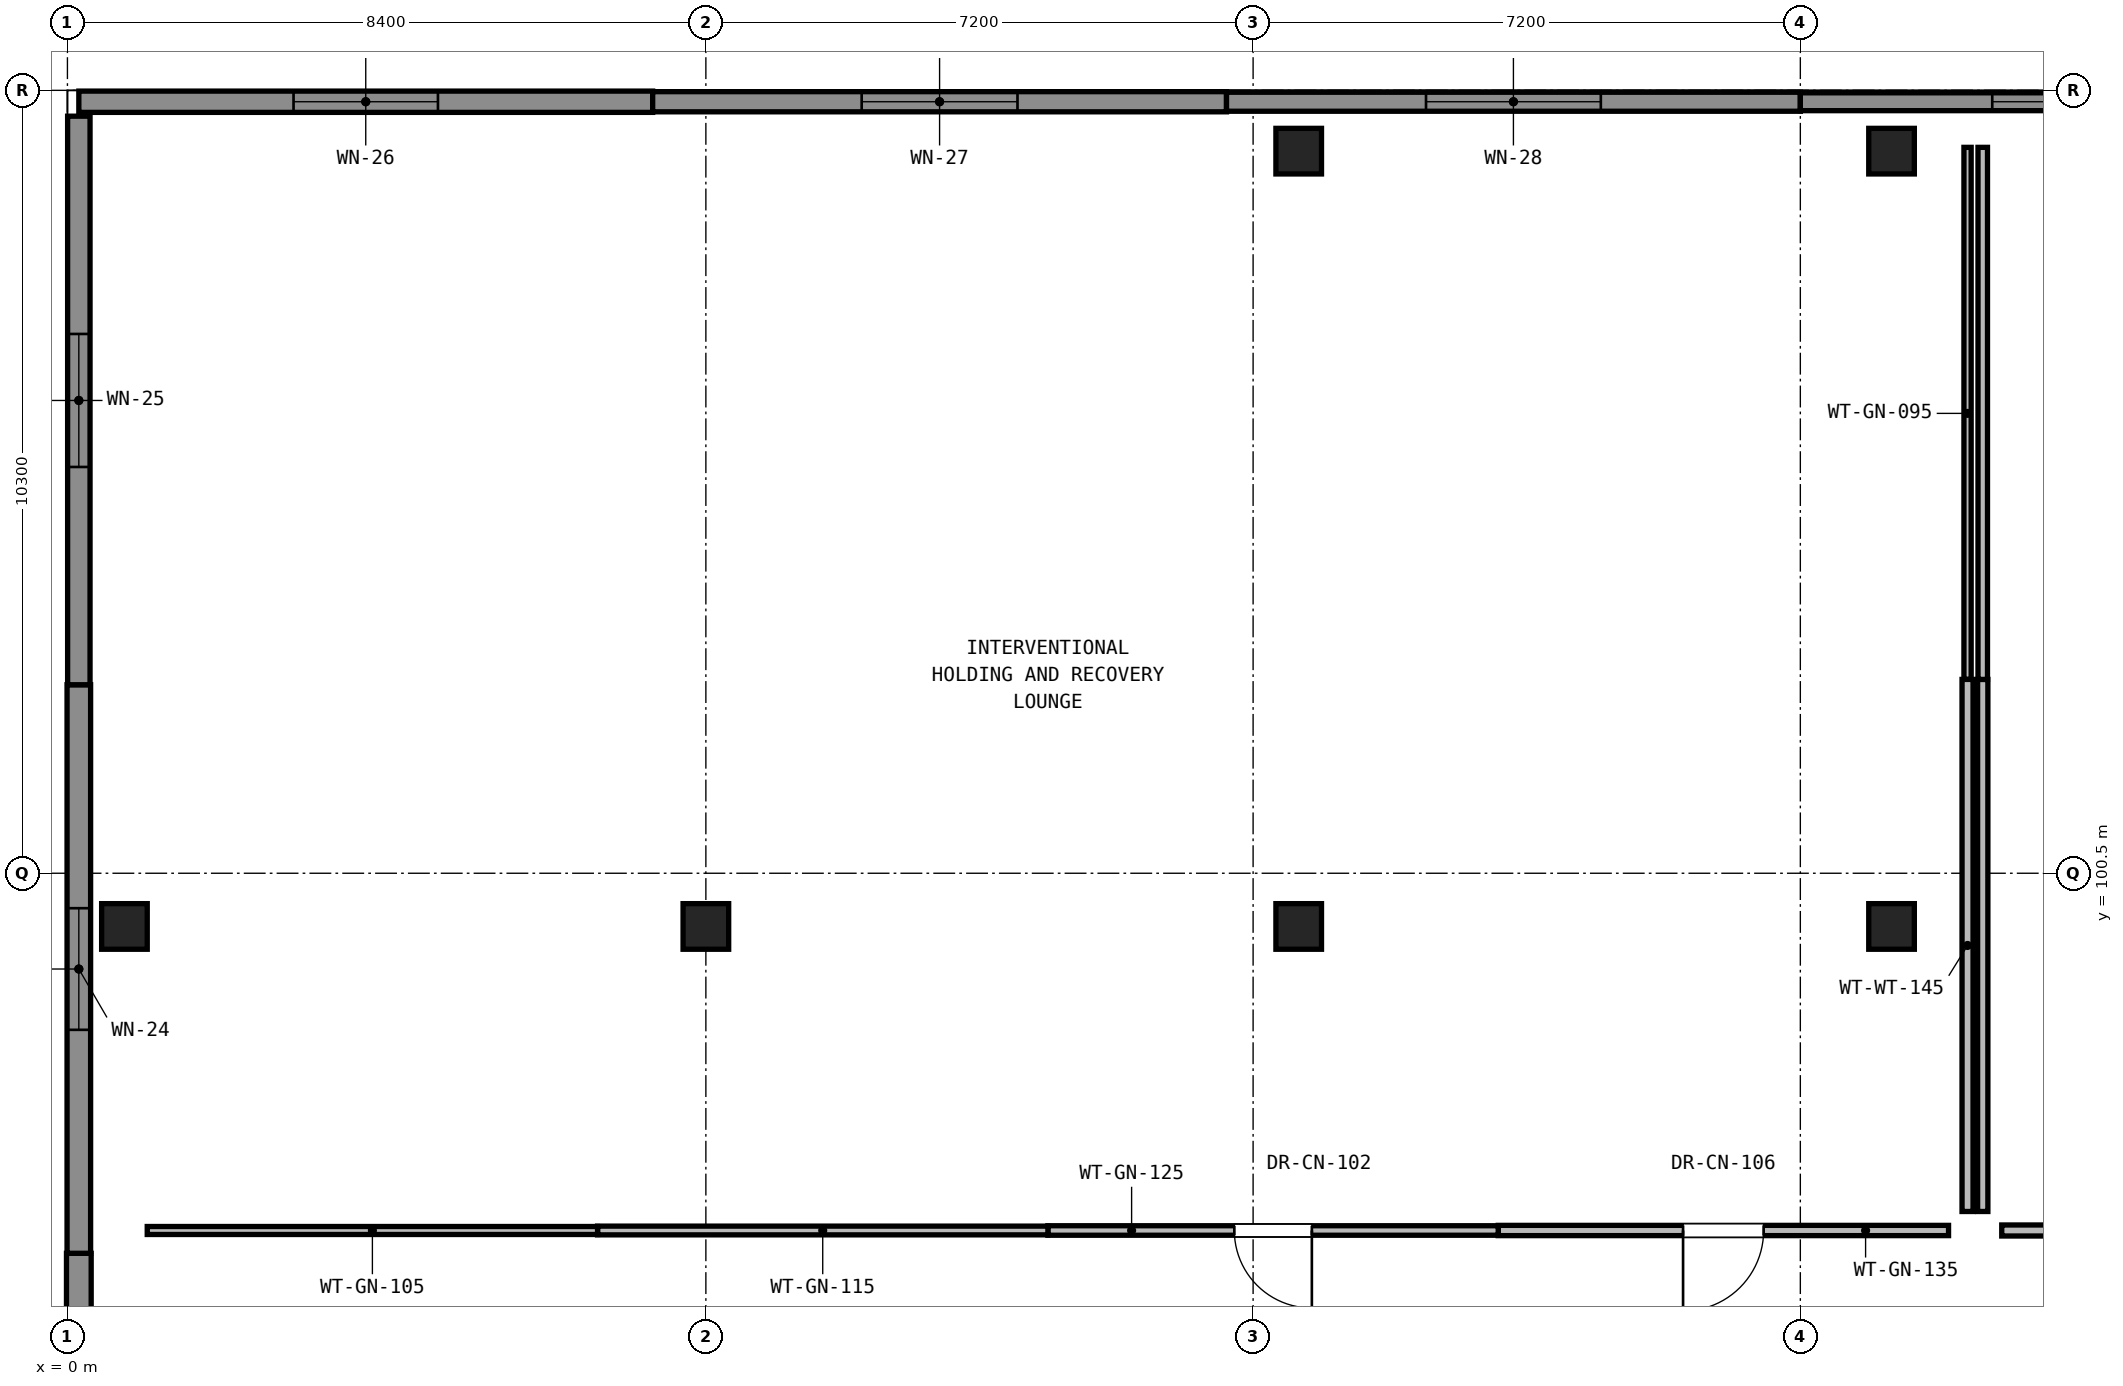
"""IFC4 building model, lengths in metres.
Left out: names, types, materials, properties, quantities, classifications, styles, units other than length and angle.
Written with IfcOpenShell. Run it as: python <this file> out.ifc"""

import sys

from ifc_helpers import new_model, si_unit, direction, frame, frame_2d, origin, origin_2d, place, context, subcontext, project, spatial, rectangle, extrude, element, fill, save


model = new_model("IFC4")
c1 = context("Model", 3, precision=1e-05, world=origin(), true_north=direction((0.0, 1.0)))
c2 = subcontext(c1, "Body", "Model", "MODEL_VIEW")
j1 = project(units=[si_unit("LENGTHUNIT", "METRE"), si_unit("PLANEANGLEUNIT", "RADIAN")], contexts=[c1])
p1 = place(None, origin())
s1 = spatial("IfcSite", under=j1, at=p1, CompositionType="ELEMENT")
p2 = place(p1, origin())
s2 = spatial("IfcBuilding", under=s1, at=p2, CompositionType="ELEMENT")
p3 = place(p2, frame((0.0, 0.0, 9.52)))
s3 = spatial("IfcBuildingStorey", under=s2, at=p3, CompositionType="ELEMENT", Elevation=9.52)
for number, where, z_axis, x_axis in (
    (1, (0.75, 99.8, 0.0), (0.0, 0.0, 1.0), (1.0, 0.0, 0.0)),
    (2, (8.4, 99.8, 0.0), (0.0, 0.0, 1.0), (1.0, 0.0, 0.0)),
    (3, (16.2, 99.8, 0.0), (0.0, 0.0, 1.0), (1.0, 0.0, 0.0)),
    (4, (16.2, 110.0, 0.0), (0.0, 0.0, 1.0), (1.0, 0.0, 0.0)),
    (5, (24.0, 99.8, 0.0), (0.0, 0.0, 1.0), (1.0, 0.0, 0.0)),
    (6, (24.0, 110.0, 0.0), (0.0, 0.0, 1.0), (1.0, 0.0, 0.0)),
):
    element("IfcColumn", number, at=place(p3, frame(where, z_axis=z_axis, x_axis=x_axis)), inside=s3, PredefinedType="COLUMN", context=c2, shape_type="SweptSolid", body=[
        extrude(rectangle(XDim=0.6, YDim=0.6, at=origin_2d()), origin(), (0.0, 0.0, 1.0), 4.08),
    ])
p4 = place(p3, frame((0.15, 88.02, 0.0), z_axis=(0.0, 0.0, 1.0), x_axis=(0.0, 1.0, 0.0)))
e7 = element("IfcWall", 7, at=p4, inside=s3, PredefinedType="SOLIDWALL", context=c2, shape_type="SweptSolid", body=[
    extrude(rectangle(XDim=7.48, YDim=0.325, at=frame_2d((3.74, 0.0))), origin(), (0.0, 0.0, 1.0), 3.843),
])
p5 = place(p4, frame((3.015, 0.0, 0.9)))
e8 = element("IfcOpeningElement", 8, at=p5, cuts=e7, PredefinedType="OPENING", context=c2, shape_type="SweptSolid", body=[
    extrude(rectangle(XDim=1.45, YDim=2.0, at=frame_2d((0.725, 1.0))), frame((0.0, 0.172, 0.0), z_axis=(0.0, -1.0, 0.0), x_axis=(1.0, 0.0, 0.0)), (0.0, 0.0, 1.0), 0.345),
])
p6 = place(p3, frame((0.15, 95.5, 0.0), z_axis=(0.0, 0.0, 1.0), x_axis=(0.0, 1.0, 0.0)))
e9 = element("IfcWall", 9, at=p6, inside=s3, PredefinedType="SOLIDWALL", context=c2, shape_type="SweptSolid", body=[
    extrude(rectangle(XDim=7.48, YDim=0.31, at=frame_2d((3.74, 0.0))), origin(), (0.0, 0.0, 1.0), 3.843),
])
p7 = place(p6, frame((2.94, 0.0, 0.9)))
e10 = element("IfcOpeningElement", 10, at=p7, cuts=e9, PredefinedType="OPENING", context=c2, shape_type="SweptSolid", body=[
    extrude(rectangle(XDim=1.6, YDim=2.0, at=frame_2d((0.8, 1.0))), frame((0.0, 0.165, 0.0), z_axis=(0.0, -1.0, 0.0), x_axis=(1.0, 0.0, 0.0)), (0.0, 0.0, 1.0), 0.33),
])
p8 = place(p3, frame((0.15, 102.98, 0.0), z_axis=(0.0, 0.0, 1.0), x_axis=(0.0, 1.0, 0.0)))
e11 = element("IfcWall", 11, at=p8, inside=s3, PredefinedType="SOLIDWALL", context=c2, shape_type="SweptSolid", body=[
    extrude(rectangle(XDim=7.48, YDim=0.295, at=frame_2d((3.74, 0.0))), origin(), (0.0, 0.0, 1.0), 3.843),
])
p9 = place(p8, frame((2.865, 0.0, 0.9)))
e12 = element("IfcOpeningElement", 12, at=p9, cuts=e11, PredefinedType="OPENING", context=c2, shape_type="SweptSolid", body=[
    extrude(rectangle(XDim=1.75, YDim=2.0, at=frame_2d((0.875, 1.0))), frame((0.0, 0.157, 0.0), z_axis=(0.0, -1.0, 0.0), x_axis=(1.0, 0.0, 0.0)), (0.0, 0.0, 1.0), 0.315),
])
p10 = place(p3, frame((0.15, 110.65, 0.0), z_axis=(0.0, 0.0, 1.0), x_axis=(1.0, 0.0, 0.0)))
e13 = element("IfcWall", 13, at=p10, inside=s3, PredefinedType="SOLIDWALL", context=c2, shape_type="SweptSolid", body=[
    extrude(rectangle(XDim=7.55, YDim=0.28, at=frame_2d((3.775, 0.0))), origin(), (0.0, 0.0, 1.0), 3.843),
])
p11 = place(p10, frame((2.825, 0.0, 0.9)))
e14 = element("IfcOpeningElement", 14, at=p11, cuts=e13, PredefinedType="OPENING", context=c2, shape_type="SweptSolid", body=[
    extrude(rectangle(XDim=1.9, YDim=2.0, at=frame_2d((0.95, 1.0))), frame((0.0, 0.15, 0.0), z_axis=(0.0, -1.0, 0.0), x_axis=(1.0, 0.0, 0.0)), (0.0, 0.0, 1.0), 0.3),
])
p12 = place(p3, frame((7.7, 110.65, 0.0), z_axis=(0.0, 0.0, 1.0), x_axis=(1.0, 0.0, 0.0)))
e15 = element("IfcWall", 15, at=p12, inside=s3, PredefinedType="SOLIDWALL", context=c2, shape_type="SweptSolid", body=[
    extrude(rectangle(XDim=7.55, YDim=0.265, at=frame_2d((3.775, 0.0))), origin(), (0.0, 0.0, 1.0), 3.843),
])
p13 = place(p12, frame((2.75, 0.0, 0.9)))
e16 = element("IfcOpeningElement", 16, at=p13, cuts=e15, PredefinedType="OPENING", context=c2, shape_type="SweptSolid", body=[
    extrude(rectangle(XDim=2.05, YDim=2.0, at=frame_2d((1.025, 1.0))), frame((0.0, 0.142, 0.0), z_axis=(0.0, -1.0, 0.0), x_axis=(1.0, 0.0, 0.0)), (0.0, 0.0, 1.0), 0.285),
])
p14 = place(p3, frame((15.25, 110.65, 0.0), z_axis=(0.0, 0.0, 1.0), x_axis=(1.0, 0.0, 0.0)))
e17 = element("IfcWall", 17, at=p14, inside=s3, PredefinedType="SOLIDWALL", context=c2, shape_type="SweptSolid", body=[
    extrude(rectangle(XDim=7.55, YDim=0.25, at=frame_2d((3.775, 0.0))), origin(), (0.0, 0.0, 1.0), 3.843),
])
p15 = place(p14, frame((2.625, 0.0, 0.9)))
e18 = element("IfcOpeningElement", 18, at=p15, cuts=e17, PredefinedType="OPENING", context=c2, shape_type="SweptSolid", body=[
    extrude(rectangle(XDim=2.3, YDim=2.0, at=frame_2d((1.15, 1.0))), frame((0.0, 0.135, 0.0), z_axis=(0.0, -1.0, 0.0), x_axis=(1.0, 0.0, 0.0)), (0.0, 0.0, 1.0), 0.27),
])
p16 = place(p3, frame((22.8, 110.65, 0.0), z_axis=(0.0, 0.0, 1.0), x_axis=(1.0, 0.0, 0.0)))
e19 = element("IfcWall", 19, at=p16, inside=s3, PredefinedType="SOLIDWALL", context=c2, shape_type="SweptSolid", body=[
    extrude(rectangle(XDim=7.55, YDim=0.235, at=frame_2d((3.775, 0.0))), origin(), (0.0, 0.0, 1.0), 3.843),
])
p17 = place(p16, frame((2.525, 0.0, 0.9)))
e20 = element("IfcOpeningElement", 20, at=p17, cuts=e19, PredefinedType="OPENING", context=c2, shape_type="SweptSolid", body=[
    extrude(rectangle(XDim=2.5, YDim=2.0, at=frame_2d((1.25, 1.0))), frame((0.0, 0.127, 0.0), z_axis=(0.0, -1.0, 0.0), x_axis=(1.0, 0.0, 0.0)), (0.0, 0.0, 1.0), 0.255),
])
p18 = place(p3, frame((25.0, 110.05, 0.0), z_axis=(0.0, 0.0, 1.0), x_axis=(0.0, -1.0, 0.0)))
e21 = element("IfcWall", 21, at=p18, inside=s3, PredefinedType="PARTITIONING", context=c2, shape_type="SweptSolid", body=[
    extrude(rectangle(XDim=7.0, YDim=0.095, at=frame_2d((3.5, 0.0))), origin(), (0.0, 0.0, 1.0), 3.143),
])
p19 = place(p3, frame((25.0, 103.05, 0.0), z_axis=(0.0, 0.0, 1.0), x_axis=(0.0, -1.0, 0.0)))
e22 = element("IfcWall", 22, at=p19, inside=s3, PredefinedType="PARTITIONING", context=c2, shape_type="SweptSolid", body=[
    extrude(rectangle(XDim=7.0, YDim=0.145, at=frame_2d((3.5, 0.0))), origin(), (0.0, 0.0, 1.0), 3.043),
])
p20 = place(p3, frame((24.75, 95.8, 0.0), z_axis=(0.0, 0.0, 1.0), x_axis=(-1.0, 0.0, 0.0)))
e23 = element("IfcWall", 23, at=p20, inside=s3, PredefinedType="PARTITIONING", context=c2, shape_type="SweptSolid", body=[
    extrude(rectangle(XDim=5.925, YDim=0.135, at=frame_2d((2.962, 0.0))), origin(), (0.0, 0.0, 1.0), 3.143),
])
p21 = place(p20, frame((2.433, 0.0, 0.0)))
e24 = element("IfcOpeningElement", 24, at=p21, cuts=e23, PredefinedType="OPENING", context=c2, shape_type="SweptSolid", body=[
    extrude(rectangle(XDim=1.06, YDim=2.15, at=frame_2d((0.53, 1.075))), frame((0.0, 0.077, 0.0), z_axis=(0.0, -1.0, 0.0), x_axis=(1.0, 0.0, 0.0)), (0.0, 0.0, 1.0), 0.155),
])
p22 = place(p3, frame((18.825, 95.8, 0.0), z_axis=(0.0, 0.0, 1.0), x_axis=(-1.0, 0.0, 0.0)))
e25 = element("IfcWall", 25, at=p22, inside=s3, PredefinedType="PARTITIONING", context=c2, shape_type="SweptSolid", body=[
    extrude(rectangle(XDim=5.925, YDim=0.125, at=frame_2d((2.962, 0.0))), origin(), (0.0, 0.0, 1.0), 3.243),
])
p23 = place(p22, frame((2.452, 0.0, 0.0)))
e26 = element("IfcOpeningElement", 26, at=p23, cuts=e25, PredefinedType="OPENING", context=c2, shape_type="SweptSolid", body=[
    extrude(rectangle(XDim=1.02, YDim=2.15, at=frame_2d((0.51, 1.075))), frame((0.0, 0.073, 0.0), z_axis=(0.0, -1.0, 0.0), x_axis=(1.0, 0.0, 0.0)), (0.0, 0.0, 1.0), 0.145),
])
p24 = place(p3, frame((12.9, 95.8, 0.0), z_axis=(0.0, 0.0, 1.0), x_axis=(-1.0, 0.0, 0.0)))
e27 = element("IfcWall", 27, at=p24, inside=s3, PredefinedType="PARTITIONING", context=c2, shape_type="SweptSolid", body=[
    extrude(rectangle(XDim=5.925, YDim=0.115, at=frame_2d((2.962, 0.0))), origin(), (0.0, 0.0, 1.0), 3.043),
])
p25 = place(p3, frame((6.975, 95.8, 0.0), z_axis=(0.0, 0.0, 1.0), x_axis=(-1.0, 0.0, 0.0)))
e28 = element("IfcWall", 28, at=p25, inside=s3, PredefinedType="PARTITIONING", context=c2, shape_type="SweptSolid", body=[
    extrude(rectangle(XDim=5.925, YDim=0.105, at=frame_2d((2.962, 0.0))), origin(), (0.0, 0.0, 1.0), 3.843),
])
p26 = place(p3, frame((34.75, 95.8, 0.0), z_axis=(0.0, 0.0, 1.0), x_axis=(-1.0, 0.0, 0.0)))
e29 = element("IfcWall", 29, at=p26, inside=s3, PredefinedType="PARTITIONING", context=c2, shape_type="SweptSolid", body=[
    extrude(rectangle(XDim=9.3, YDim=0.145, at=frame_2d((4.65, 0.0))), origin(), (0.0, 0.0, 1.0), 3.293),
])
p27 = place(p3, frame((25.2, 96.05, 0.0), z_axis=(0.0, 0.0, 1.0), x_axis=(0.0, 1.0, 0.0)))
e30 = element("IfcWall", 30, at=p27, inside=s3, PredefinedType="PARTITIONING", context=c2, shape_type="SweptSolid", body=[
    extrude(rectangle(XDim=7.0, YDim=0.135, at=frame_2d((3.5, 0.0))), origin(), (0.0, 0.0, 1.0), 3.043),
])
p28 = place(p3, frame((25.2, 103.05, 0.0), z_axis=(0.0, 0.0, 1.0), x_axis=(0.0, 1.0, 0.0)))
e31 = element("IfcWall", 31, at=p28, inside=s3, PredefinedType="PARTITIONING", context=c2, shape_type="SweptSolid", body=[
    extrude(rectangle(XDim=7.0, YDim=0.125, at=frame_2d((3.5, 0.0))), origin(), (0.0, 0.0, 1.0), 3.143),
])
p29 = place(p7, origin())
e32 = element("IfcWindow", 32, at=p29, inside=s3, PartitioningType="SINGLE_PANEL", PredefinedType="WINDOW", context=c2, shape_type="SweptSolid", body=[
    extrude(rectangle(XDim=1.6, YDim=2.0, at=frame_2d((0.8, 1.0))), frame((0.0, 0.03, 0.0), z_axis=(0.0, -1.0, 0.0), x_axis=(1.0, 0.0, 0.0)), (0.0, 0.0, 1.0), 0.06),
])
fill(e10, e32)
p30 = place(p9, origin())
e33 = element("IfcWindow", 33, at=p30, inside=s3, PartitioningType="SINGLE_PANEL", PredefinedType="WINDOW", context=c2, shape_type="SweptSolid", body=[
    extrude(rectangle(XDim=1.75, YDim=2.0, at=frame_2d((0.875, 1.0))), frame((0.0, 0.03, 0.0), z_axis=(0.0, -1.0, 0.0), x_axis=(1.0, 0.0, 0.0)), (0.0, 0.0, 1.0), 0.06),
])
fill(e12, e33)
p31 = place(p11, origin())
e34 = element("IfcWindow", 34, at=p31, inside=s3, PartitioningType="SINGLE_PANEL", PredefinedType="WINDOW", context=c2, shape_type="SweptSolid", body=[
    extrude(rectangle(XDim=1.9, YDim=2.0, at=frame_2d((0.95, 1.0))), frame((0.0, 0.03, 0.0), z_axis=(0.0, -1.0, 0.0), x_axis=(1.0, 0.0, 0.0)), (0.0, 0.0, 1.0), 0.06),
])
fill(e14, e34)
p32 = place(p13, origin())
e35 = element("IfcWindow", 35, at=p32, inside=s3, PartitioningType="SINGLE_PANEL", PredefinedType="WINDOW", context=c2, shape_type="SweptSolid", body=[
    extrude(rectangle(XDim=2.05, YDim=2.0, at=frame_2d((1.025, 1.0))), frame((0.0, 0.03, 0.0), z_axis=(0.0, -1.0, 0.0), x_axis=(1.0, 0.0, 0.0)), (0.0, 0.0, 1.0), 0.06),
])
fill(e16, e35)
p33 = place(p15, origin())
e36 = element("IfcWindow", 36, at=p33, inside=s3, PartitioningType="SINGLE_PANEL", PredefinedType="WINDOW", context=c2, shape_type="SweptSolid", body=[
    extrude(rectangle(XDim=2.3, YDim=2.0, at=frame_2d((1.15, 1.0))), frame((0.0, 0.03, 0.0), z_axis=(0.0, -1.0, 0.0), x_axis=(1.0, 0.0, 0.0)), (0.0, 0.0, 1.0), 0.06),
])
fill(e18, e36)
p34 = place(p17, origin())
e37 = element("IfcWindow", 37, at=p34, inside=s3, PartitioningType="SINGLE_PANEL", PredefinedType="WINDOW", context=c2, shape_type="SweptSolid", body=[
    extrude(rectangle(XDim=2.5, YDim=2.0, at=frame_2d((1.25, 1.0))), frame((0.0, 0.03, 0.0), z_axis=(0.0, -1.0, 0.0), x_axis=(1.0, 0.0, 0.0)), (0.0, 0.0, 1.0), 0.06),
])
fill(e20, e37)
p35 = place(p21, origin())
e38 = element("IfcDoor", 38, at=p35, inside=s3, OperationType="SINGLE_SWING_RIGHT", PredefinedType="DOOR", context=c2, shape_type="SweptSolid", body=[
    extrude(rectangle(XDim=1.06, YDim=2.15, at=frame_2d((0.53, 1.075))), frame((0.0, 0.025, 0.0), z_axis=(0.0, -1.0, 0.0), x_axis=(1.0, 0.0, 0.0)), (0.0, 0.0, 1.0), 0.05),
])
fill(e24, e38)
p36 = place(p23, origin())
e39 = element("IfcDoor", 39, at=p36, inside=s3, OperationType="SINGLE_SWING_LEFT", PredefinedType="DOOR", context=c2, shape_type="SweptSolid", body=[
    extrude(rectangle(XDim=1.02, YDim=2.15, at=frame_2d((0.51, 1.075))), frame((0.0, 0.025, 0.0), z_axis=(0.0, -1.0, 0.0), x_axis=(1.0, 0.0, 0.0)), (0.0, 0.0, 1.0), 0.05),
])
fill(e26, e39)
save(model, sys.argv[1])
